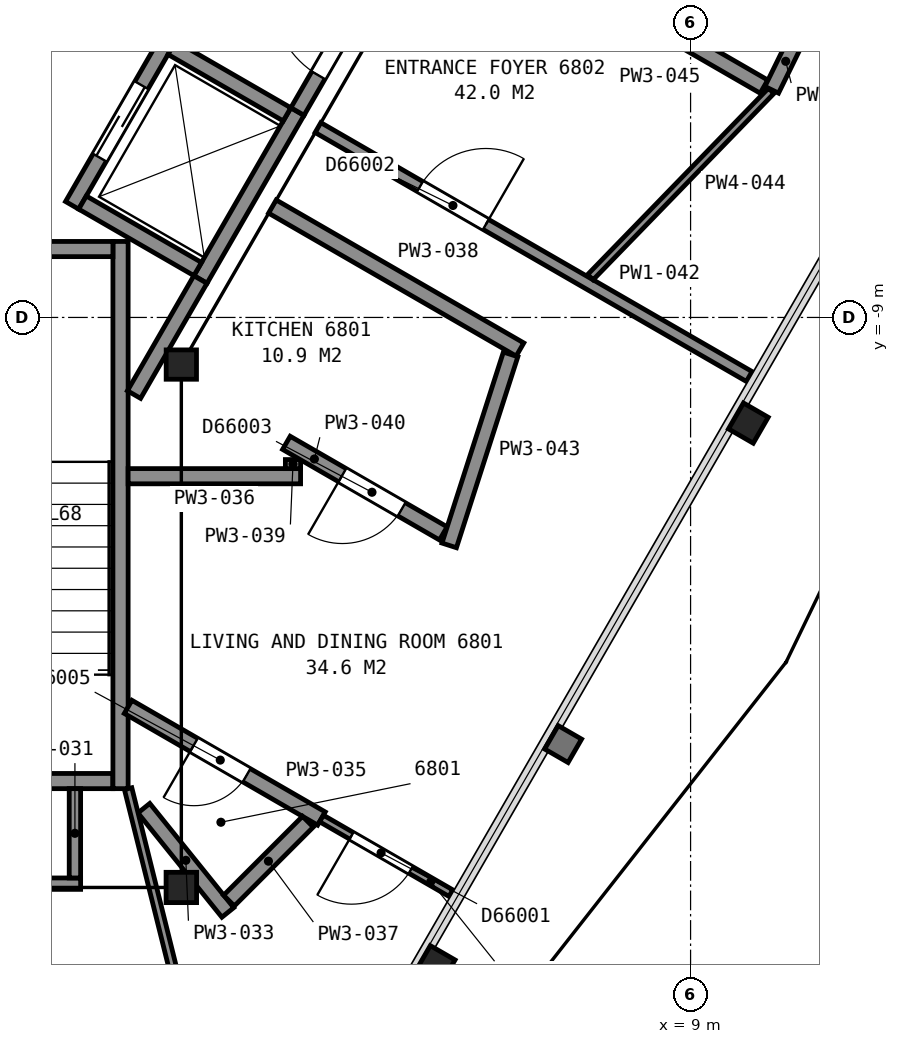
"""IFC4 building model, lengths in metres.
Left out: names, types, materials, properties, quantities, classifications, styles, units other than length and angle.
Written with IfcOpenShell. Run it as: python <this file> out.ifc"""

import sys

from ifc_helpers import new_model, si_unit, direction, frame, frame_2d, origin, origin_2d, place, context, subcontext, project, spatial, rectangle, i_section, extrude, element, fill, save


model = new_model("IFC4")
c1 = context("Model", 3, precision=1e-05, world=origin(), true_north=direction((0.0, 1.0)))
c2 = subcontext(c1, "Body", "Model", "MODEL_VIEW")
j1 = project(units=[si_unit("LENGTHUNIT", "METRE"), si_unit("PLANEANGLEUNIT", "RADIAN")], contexts=[c1])
p1 = place(None, origin())
s1 = spatial("IfcSite", under=j1, at=p1, CompositionType="ELEMENT")
p2 = place(p1, origin())
s2 = spatial("IfcBuilding", under=s1, at=p2, CompositionType="ELEMENT")
p3 = place(p2, frame((0.0, 0.0, 271.4)))
s3 = spatial("IfcBuildingStorey", under=s2, at=p3, CompositionType="ELEMENT", Elevation=271.4)
for number, where, z_axis, x_axis in (
    (1, (5.64, -17.53, 0.0), (0.0, 0.0, 1.0), (-0.5, -0.866, 0.0)),
    (2, (9.76, -10.39, 0.0), (0.0, 0.0, 1.0), (-0.5, -0.866, 0.0)),
):
    element("IfcColumn", number, at=place(p3, frame(where, z_axis=z_axis, x_axis=x_axis)), inside=s3, PredefinedType="COLUMN", context=c2, shape_type="SweptSolid", body=[
        extrude(i_section(OverallWidth=0.394, OverallDepth=0.376, WebThickness=0.017, FlangeThickness=0.028, FilletRadius=0.015, at=origin_2d()), origin(), (0.0, 0.0, 1.0), 3.7),
    ])
p4 = place(p3, frame((2.3, -16.5, 0.0), z_axis=(0.0, 0.0, 1.0), x_axis=(-1.0, 0.0, 0.0)))
e3 = element("IfcColumn", 3, at=p4, inside=s3, PredefinedType="COLUMN", context=c2, shape_type="SweptSolid", body=[
    extrude(i_section(OverallWidth=0.401, OverallDepth=0.399, WebThickness=0.025, FlangeThickness=0.04, FilletRadius=0.015, at=origin_2d()), origin(), (0.0, 0.0, 1.0), 3.7),
])
p5 = place(p3, frame((2.3, -9.62, 0.0), z_axis=(0.0, 0.0, 1.0), x_axis=(1.0, 0.0, 0.0)))
e4 = element("IfcColumn", 4, at=p5, inside=s3, PredefinedType="COLUMN", context=c2, shape_type="SweptSolid", body=[
    extrude(i_section(OverallWidth=0.399, OverallDepth=0.386, WebThickness=0.021, FlangeThickness=0.033, FilletRadius=0.015, at=origin_2d()), origin(), (0.0, 0.0, 1.0), 3.7),
])
p6 = place(p3, frame((-1.4, -15.1, 0.0), z_axis=(0.0, 0.0, 1.0), x_axis=(1.0, 0.0, 0.0)))
e5 = element("IfcWall", 5, at=p6, inside=s3, PredefinedType="PARTITIONING", context=c2, shape_type="SweptSolid", body=[
    extrude(rectangle(XDim=2.8, YDim=0.2, at=frame_2d((1.4, 0.0))), origin(), (0.0, 0.0, 1.0), 3.45),
])
p7 = place(p6, frame((0.85, 0.0, 0.0)))
e6 = element("IfcOpeningElement", 6, at=p7, cuts=e5, PredefinedType="OPENING", context=c2, shape_type="SweptSolid", body=[
    extrude(rectangle(XDim=1.1, YDim=2.1, at=frame_2d((0.55, 1.05))), frame((0.0, 0.11, 0.0), z_axis=(0.0, -1.0, 0.0), x_axis=(1.0, 0.0, 0.0)), (0.0, 0.0, 1.0), 0.22),
])
p8 = place(p3, frame((1.5, -8.0, 0.0), z_axis=(0.0, 0.0, 1.0), x_axis=(0.0, -1.0, 0.0)))
e7 = element("IfcWall", 7, at=p8, inside=s3, PredefinedType="PARTITIONING", context=c2, shape_type="SweptSolid", body=[
    extrude(rectangle(XDim=7.2, YDim=0.2, at=frame_2d((3.6, 0.0))), origin(), (0.0, 0.0, 1.0), 3.45),
])
p9 = place(p3, frame((-1.4, -8.1, 0.0), z_axis=(0.0, 0.0, 1.0), x_axis=(1.0, 0.0, 0.0)))
e8 = element("IfcWall", 8, at=p9, inside=s3, PredefinedType="PARTITIONING", context=c2, shape_type="SweptSolid", body=[
    extrude(rectangle(XDim=2.8, YDim=0.2, at=frame_2d((1.4, 0.0))), origin(), (0.0, 0.0, 1.0), 3.45),
])
p10 = place(p3, frame((2.552, -8.5, 0.0), z_axis=(0.0, 0.0, 1.0), x_axis=(0.499990435942, 0.866030925526, 0.0)))
e9 = element("IfcWall", 9, at=p10, inside=s3, PredefinedType="PARTITIONING", context=c2, shape_type="SweptSolid", body=[
    extrude(rectangle(XDim=2.55, YDim=0.2, at=frame_2d((1.275, 0.0))), origin(), (0.0, 0.0, 1.0), 3.7),
])
p11 = place(p3, frame((0.863, -7.525, 0.0), z_axis=(0.0, 0.0, 1.0), x_axis=(0.499990435942, 0.866030925526, 0.0)))
e10 = element("IfcWall", 10, at=p11, inside=s3, PredefinedType="PARTITIONING", context=c2, shape_type="SweptSolid", body=[
    extrude(rectangle(XDim=2.55, YDim=0.2, at=frame_2d((1.275, 0.0))), origin(), (0.0, 0.0, 1.0), 3.7),
])
p12 = place(p11, frame((0.725, 0.0, 0.0)))
e11 = element("IfcOpeningElement", 11, at=p12, cuts=e10, PredefinedType="OPENING", context=c2, shape_type="SweptSolid", body=[
    extrude(rectangle(XDim=1.1, YDim=2.1, at=frame_2d((0.55, 1.05))), frame((0.0, 0.11, 0.0), z_axis=(0.0, -1.0, 0.0), x_axis=(1.0, 0.0, 0.0)), (0.0, 0.0, 1.0), 0.22),
])
for number, where, z_axis, x_axis in (
    (12, (3.69, -6.328, 0.0), (0.0, 0.0, 1.0), (-0.866, 0.5, 0.0)),
    (13, (2.515, -8.363, 0.0), (0.0, 0.0, 1.0), (-0.866, 0.5, 0.0)),
):
    element("IfcWall", number, at=place(p3, frame(where, z_axis=z_axis, x_axis=x_axis)), inside=s3, PredefinedType="PARTITIONING", context=c2, shape_type="SweptSolid", body=[
        extrude(rectangle(XDim=1.75, YDim=0.2, at=frame_2d((0.875, 0.0))), origin(), (0.0, 0.0, 1.0), 3.7),
    ])
p13 = place(p3, frame((1.677, -10.015, 0.0), z_axis=(0.0, 0.0, 1.0), x_axis=(0.49983532306, 0.866120459187, 0.0)))
e14 = element("IfcWall", 14, at=p13, inside=s3, PredefinedType="PARTITIONING", context=c2, shape_type="SweptSolid", body=[
    extrude(rectangle(XDim=1.748, YDim=0.2, at=frame_2d((0.874, 0.0))), origin(), (0.0, 0.0, 1.0), 3.45),
])
p14 = place(p3, frame((3.828, -6.29, 0.0), z_axis=(0.0, 0.0, 1.0), x_axis=(0.499979739078, 0.866037101117, 0.0)))
e15 = element("IfcWall", 15, at=p14, inside=s3, PredefinedType="PARTITIONING", context=c2, shape_type="SweptSolid", body=[
    extrude(rectangle(XDim=11.363, YDim=0.2, at=frame_2d((5.681, 0.0))), origin(), (0.0, 0.0, 1.0), 3.45),
])
p15 = place(p14, frame((0.55, 0.0, 0.0)))
e16 = element("IfcOpeningElement", 16, at=p15, cuts=e15, PredefinedType="OPENING", context=c2, shape_type="SweptSolid", body=[
    extrude(rectangle(XDim=1.2, YDim=2.1, at=frame_2d((0.6, 1.05))), frame((0.0, 0.11, 0.0), z_axis=(0.0, -1.0, 0.0), x_axis=(1.0, 0.0, 0.0)), (0.0, 0.0, 1.0), 0.22),
])
p16 = place(p3, frame((-1.65, -16.45, 0.0), z_axis=(0.0, 0.0, 1.0), x_axis=(1.0, 0.0, 0.0)))
e17 = element("IfcWall", 17, at=p16, inside=s3, PredefinedType="PARTITIONING", context=c2, shape_type="SweptSolid", body=[
    extrude(rectangle(XDim=2.625, YDim=0.15, at=frame_2d((1.312, 0.0))), origin(), (0.0, 0.0, 1.0), 2.723),
])
p17 = place(p3, frame((0.9, -16.375, 0.0), z_axis=(0.0, 0.0, 1.0), x_axis=(0.0, 1.0, 0.0)))
e18 = element("IfcWall", 18, at=p17, inside=s3, PredefinedType="PARTITIONING", context=c2, shape_type="SweptSolid", body=[
    extrude(rectangle(XDim=1.175, YDim=0.15, at=frame_2d((0.587, 0.0))), origin(), (0.0, 0.0, 1.0), 2.723),
])
p18 = place(p3, frame((1.807, -15.457, 0.0), z_axis=(0.0, 0.0, 1.0), x_axis=(0.62721044395, -0.778849830841, 0.0)))
e19 = element("IfcWall", 19, at=p18, inside=s3, PredefinedType="PARTITIONING", context=c2, shape_type="SweptSolid", body=[
    extrude(rectangle(XDim=1.761, YDim=0.2, at=frame_2d((0.881, 0.0))), origin(), (0.0, 0.0, 1.0), 2.723),
])
p19 = place(p3, frame((3.127, -21.335, 0.0), z_axis=(0.0, 0.0, 1.0), x_axis=(-0.241554155251, 0.970387340231, 0.0)))
e20 = element("IfcWall", 20, at=p19, inside=s3, PredefinedType="PARTITIONING", context=c2, shape_type="SweptSolid", body=[
    extrude(rectangle(XDim=6.322, YDim=0.1, at=frame_2d((3.161, 0.0))), origin(), (0.0, 0.0, 1.0), 2.723),
])
p20 = place(p19, frame((2.722, 0.0, 0.0)))
e21 = element("IfcOpeningElement", 21, at=p20, cuts=e20, PredefinedType="OPENING", context=c2, shape_type="SweptSolid", body=[
    extrude(rectangle(XDim=1.0, YDim=2.1, at=frame_2d((0.5, 1.05))), frame((0.0, 0.06, 0.0), z_axis=(0.0, -1.0, 0.0), x_axis=(1.0, 0.0, 0.0)), (0.0, 0.0, 1.0), 0.12),
])
p21 = place(p3, frame((4.144, -15.593, 0.0), z_axis=(0.0, 0.0, 1.0), x_axis=(-0.865947474014, 0.500134954036, 0.0)))
e22 = element("IfcWall", 22, at=p21, inside=s3, PredefinedType="PARTITIONING", context=c2, shape_type="SweptSolid", body=[
    extrude(rectangle(XDim=2.937, YDim=0.2, at=frame_2d((1.469, 0.0))), origin(), (0.0, 0.0, 1.0), 2.723),
])
p22 = place(p21, frame((1.137, 0.0, 0.0)))
e23 = element("IfcOpeningElement", 23, at=p22, cuts=e22, PredefinedType="OPENING", context=c2, shape_type="SweptSolid", body=[
    extrude(rectangle(XDim=0.8, YDim=2.1, at=frame_2d((0.4, 1.05))), frame((0.0, 0.11, 0.0), z_axis=(0.0, -1.0, 0.0), x_axis=(1.0, 0.0, 0.0)), (0.0, 0.0, 1.0), 0.22),
])
p23 = place(p3, frame((1.6, -11.089, 0.0), z_axis=(0.0, 0.0, 1.0), x_axis=(1.0, 0.0, 0.0)))
e24 = element("IfcWall", 24, at=p23, inside=s3, PredefinedType="PARTITIONING", context=c2, shape_type="SweptSolid", body=[
    extrude(rectangle(XDim=2.269, YDim=0.2, at=frame_2d((1.134, 0.0))), origin(), (0.0, 0.0, 1.0), 2.723),
])
p24 = place(p3, frame((2.927, -16.673, 0.0), z_axis=(0.0, 0.0, 1.0), x_axis=(0.707106781187, 0.707106781187, 0.0)))
e25 = element("IfcWall", 25, at=p24, inside=s3, PredefinedType="PARTITIONING", context=c2, shape_type="SweptSolid", body=[
    extrude(rectangle(XDim=1.469, YDim=0.2, at=frame_2d((0.734, 0.0))), origin(), (0.0, 0.0, 1.0), 2.723),
])
p25 = place(p3, frame((3.498, -7.541, 0.0), z_axis=(0.0, 0.0, 1.0), x_axis=(0.865985624761, -0.500068892961, 0.0)))
e26 = element("IfcWall", 26, at=p25, inside=s3, PredefinedType="PARTITIONING", context=c2, shape_type="SweptSolid", body=[
    extrude(rectangle(XDim=3.762, YDim=0.2, at=frame_2d((1.881, 0.0))), origin(), (0.0, 0.0, 1.0), 2.723),
])
p26 = place(p3, frame((3.769, -10.989, 0.0), z_axis=(0.0, 0.0, 1.0), x_axis=(0.0, 1.0, 0.0)))
e27 = element("IfcWall", 27, at=p26, inside=s3, PredefinedType="PARTITIONING", context=c2, shape_type="SweptSolid", body=[
    extrude(rectangle(XDim=0.119, YDim=0.2, at=frame_2d((0.06, 0.0))), origin(), (0.0, 0.0, 1.0), 2.723),
])
p27 = place(p3, frame((3.682, -10.65, 0.0), z_axis=(0.0, 0.0, 1.0), x_axis=(0.86607302589, -0.499917507021, 0.0)))
e28 = element("IfcWall", 28, at=p27, inside=s3, PredefinedType="PARTITIONING", context=c2, shape_type="SweptSolid", body=[
    extrude(rectangle(XDim=2.384, YDim=0.2, at=frame_2d((1.192, 0.0))), origin(), (0.0, 0.0, 1.0), 2.723),
])
p28 = place(p27, frame((0.85, 0.0, 0.0)))
e29 = element("IfcOpeningElement", 29, at=p28, cuts=e28, PredefinedType="OPENING", context=c2, shape_type="SweptSolid", body=[
    extrude(rectangle(XDim=0.9, YDim=2.1, at=frame_2d((0.45, 1.05))), frame((0.0, 0.11, 0.0), z_axis=(0.0, -1.0, 0.0), x_axis=(1.0, 0.0, 0.0)), (0.0, 0.0, 1.0), 0.22),
])
p29 = place(p3, frame((5.847, -16.575, 0.0), z_axis=(0.0, 0.0, 1.0), x_axis=(-0.866156637233, 0.499772628079, 0.0)))
e30 = element("IfcWall", 30, at=p29, inside=s3, PredefinedType="PARTITIONING", context=c2, shape_type="SweptSolid", body=[
    extrude(rectangle(XDim=1.966, YDim=0.1, at=frame_2d((0.983, 0.0))), origin(), (0.0, 0.0, 1.0), 2.723),
])
p30 = place(p29, frame((0.611, 0.0, 0.0)))
e31 = element("IfcOpeningElement", 31, at=p30, cuts=e30, PredefinedType="OPENING", context=c2, shape_type="SweptSolid", body=[
    extrude(rectangle(XDim=0.9, YDim=2.1, at=frame_2d((0.45, 1.05))), frame((0.0, 0.06, 0.0), z_axis=(0.0, -1.0, 0.0), x_axis=(1.0, 0.0, 0.0)), (0.0, 0.0, 1.0), 0.12),
])
p31 = place(p3, frame((9.772, -9.777, 0.0), z_axis=(0.0, 0.0, 1.0), x_axis=(-0.866083818164, 0.499898809675, 0.0)))
e32 = element("IfcWall", 32, at=p31, inside=s3, PredefinedType="PARTITIONING", context=c2, shape_type="SweptSolid", body=[
    extrude(rectangle(XDim=6.551, YDim=0.15, at=frame_2d((3.275, 0.0))), origin(), (0.0, 0.0, 1.0), 2.723),
])
p32 = place(p31, frame((4.001, 0.0, 0.0)))
e33 = element("IfcOpeningElement", 33, at=p32, cuts=e32, PredefinedType="OPENING", context=c2, shape_type="SweptSolid", body=[
    extrude(rectangle(XDim=1.0, YDim=2.1, at=frame_2d((0.5, 1.05))), frame((0.0, 0.085, 0.0), z_axis=(0.0, -1.0, 0.0), x_axis=(1.0, 0.0, 0.0)), (0.0, 0.0, 1.0), 0.17),
])
p33 = place(p3, frame((5.824, -11.999, 0.0), z_axis=(0.0, 0.0, 1.0), x_axis=(0.306054089199, 0.95201412515, 0.0)))
e34 = element("IfcWall", 34, at=p33, inside=s3, PredefinedType="PARTITIONING", context=c2, shape_type="SweptSolid", body=[
    extrude(rectangle(XDim=2.64, YDim=0.2, at=frame_2d((1.32, 0.0))), origin(), (0.0, 0.0, 1.0), 2.723),
])
p34 = place(p3, frame((7.682, -8.47, 0.0), z_axis=(0.0, 0.0, 1.0), x_axis=(0.696344433623, 0.717707760696, 0.0)))
e35 = element("IfcWall", 35, at=p34, inside=s3, PredefinedType="PARTITIONING", context=c2, shape_type="SweptSolid", body=[
    extrude(rectangle(XDim=3.417, YDim=0.1, at=frame_2d((1.708, 0.0))), origin(), (0.0, 0.0, 1.0), 2.723),
])
p35 = place(p3, frame((8.325, -5.016, 0.0), z_axis=(0.0, 0.0, 1.0), x_axis=(0.866093293964, -0.499882392319, 0.0)))
e36 = element("IfcWall", 36, at=p35, inside=s3, PredefinedType="PARTITIONING", context=c2, shape_type="SweptSolid", body=[
    extrude(rectangle(XDim=1.894, YDim=0.2, at=frame_2d((0.947, 0.0))), origin(), (0.0, 0.0, 1.0), 2.723),
])
p36 = place(p3, frame((10.068, -6.005, 0.0), z_axis=(0.0, 0.0, 1.0), x_axis=(0.440614307878, 0.897696514248, 0.0)))
e37 = element("IfcWall", 37, at=p36, inside=s3, PredefinedType="PARTITIONING", context=c2, shape_type="SweptSolid", body=[
    extrude(rectangle(XDim=2.491, YDim=0.2, at=frame_2d((1.245, 0.0))), origin(), (0.0, 0.0, 1.0), 2.723),
])
p37 = place(p36, frame((0.835, 0.0, 0.0)))
e38 = element("IfcOpeningElement", 38, at=p37, cuts=e37, PredefinedType="OPENING", context=c2, shape_type="SweptSolid", body=[
    extrude(rectangle(XDim=0.9, YDim=2.1, at=frame_2d((0.45, 1.05))), frame((0.0, 0.11, 0.0), z_axis=(0.0, -1.0, 0.0), x_axis=(1.0, 0.0, 0.0)), (0.0, 0.0, 1.0), 0.22),
])
p38 = place(p12, origin())
e39 = element("IfcDoor", 39, at=p38, inside=s3, OperationType="SLIDING_TO_LEFT", PredefinedType="DOOR", context=c2, shape_type="SweptSolid", body=[
    extrude(rectangle(XDim=1.1, YDim=2.1, at=frame_2d((0.55, 1.05))), frame((0.0, 0.025, 0.0), z_axis=(0.0, -1.0, 0.0), x_axis=(1.0, 0.0, 0.0)), (0.0, 0.0, 1.0), 0.05),
])
fill(e11, e39)
p39 = place(p15, origin())
e40 = element("IfcDoor", 40, at=p39, inside=s3, OperationType="SINGLE_SWING_RIGHT", PredefinedType="DOOR", context=c2, shape_type="SweptSolid", body=[
    extrude(rectangle(XDim=1.2, YDim=2.1, at=frame_2d((0.6, 1.05))), frame((0.0, 0.025, 0.0), z_axis=(0.0, -1.0, 0.0), x_axis=(1.0, 0.0, 0.0)), (0.0, 0.0, 1.0), 0.05),
])
fill(e16, e40)
p40 = place(p22, origin())
e41 = element("IfcDoor", 41, at=p40, inside=s3, OperationType="SINGLE_SWING_RIGHT", PredefinedType="DOOR", context=c2, shape_type="SweptSolid", body=[
    extrude(rectangle(XDim=0.8, YDim=2.1, at=frame_2d((0.4, 1.05))), frame((0.0, 0.025, 0.0), z_axis=(0.0, -1.0, 0.0), x_axis=(1.0, 0.0, 0.0)), (0.0, 0.0, 1.0), 0.05),
])
fill(e23, e41)
p41 = place(p28, origin())
e42 = element("IfcDoor", 42, at=p41, inside=s3, OperationType="SINGLE_SWING_LEFT", PredefinedType="DOOR", context=c2, shape_type="SweptSolid", body=[
    extrude(rectangle(XDim=0.9, YDim=2.1, at=frame_2d((0.45, 1.05))), frame((0.0, 0.025, 0.0), z_axis=(0.0, -1.0, 0.0), x_axis=(1.0, 0.0, 0.0)), (0.0, 0.0, 1.0), 0.05),
])
fill(e29, e42)
p42 = place(p30, origin())
e43 = element("IfcDoor", 43, at=p42, inside=s3, OperationType="SINGLE_SWING_RIGHT", PredefinedType="DOOR", context=c2, shape_type="SweptSolid", body=[
    extrude(rectangle(XDim=0.9, YDim=2.1, at=frame_2d((0.45, 1.05))), frame((0.0, 0.025, 0.0), z_axis=(0.0, -1.0, 0.0), x_axis=(1.0, 0.0, 0.0)), (0.0, 0.0, 1.0), 0.05),
])
fill(e31, e43)
p43 = place(p32, origin())
e44 = element("IfcDoor", 44, at=p43, inside=s3, OperationType="SINGLE_SWING_LEFT", PredefinedType="DOOR", context=c2, shape_type="SweptSolid", body=[
    extrude(rectangle(XDim=1.0, YDim=2.1, at=frame_2d((0.5, 1.05))), frame((0.0, 0.025, 0.0), z_axis=(0.0, -1.0, 0.0), x_axis=(1.0, 0.0, 0.0)), (0.0, 0.0, 1.0), 0.05),
])
fill(e33, e44)
save(model, sys.argv[1])
